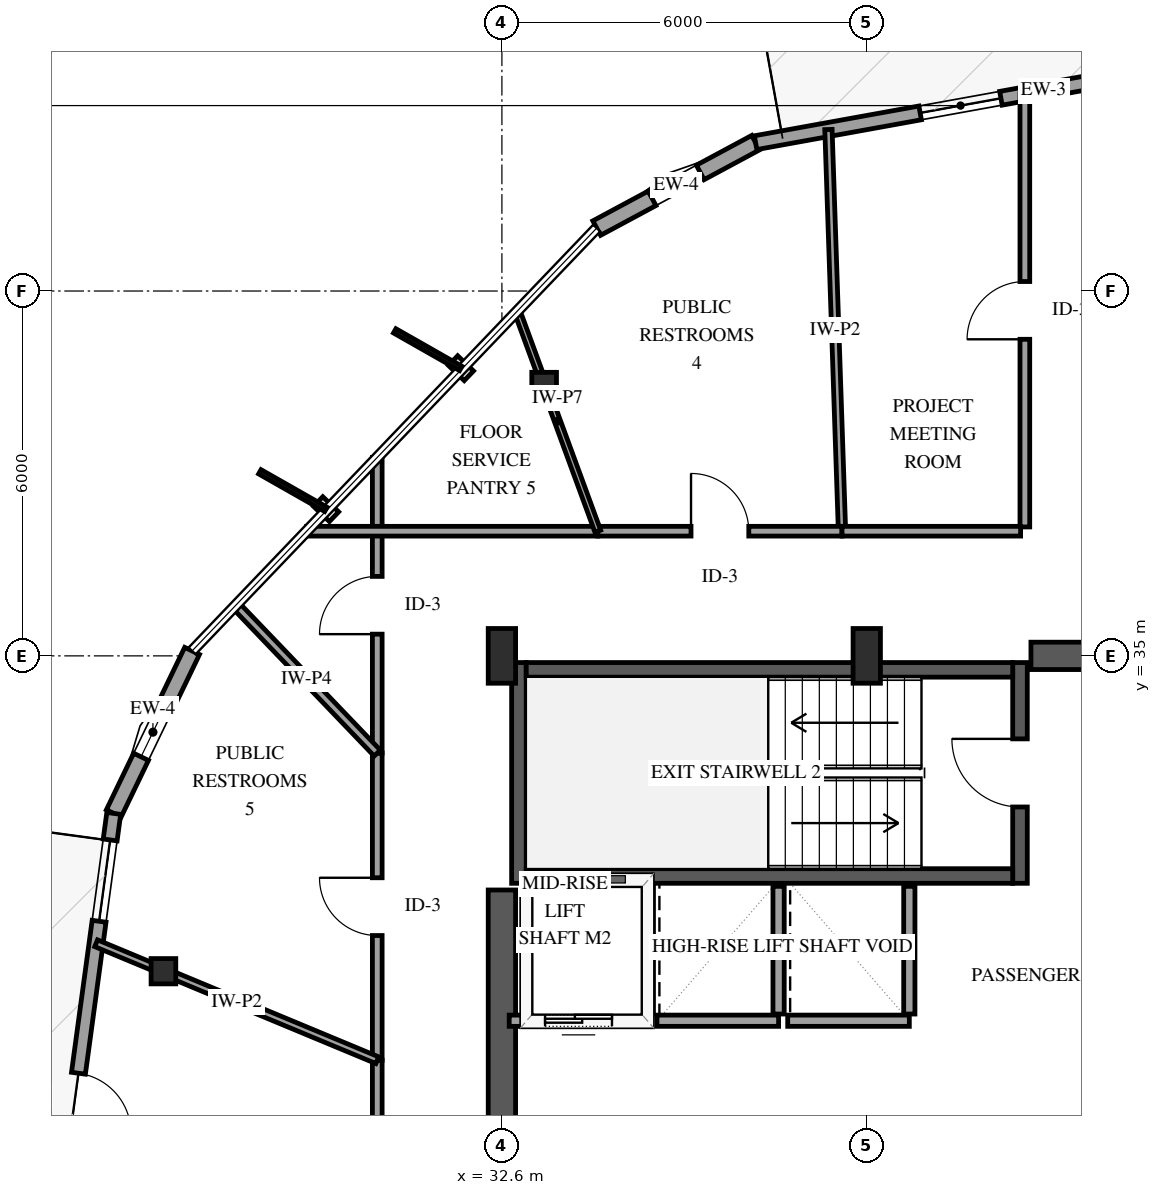
"""IFC4 building model, lengths in metres.
Left out: names, types, materials, properties, quantities, classifications, styles, units other than length and angle.
Written with IfcOpenShell. Run it as: python <this file> out.ifc"""

import sys

from ifc_helpers import new_model, si_unit, direction, frame, frame_2d, origin, origin_2d, place, context, subcontext, project, spatial, rectangle, i_section, extrude, element, fill, save


model = new_model("IFC4")
c1 = context("Model", 3, precision=1e-05, world=origin(), true_north=direction((0.0, 1.0)))
c2 = subcontext(c1, "Body", "Model", "MODEL_VIEW")
j1 = project(units=[si_unit("LENGTHUNIT", "METRE"), si_unit("PLANEANGLEUNIT", "RADIAN")], contexts=[c1])
p1 = place(None, origin())
s1 = spatial("IfcSite", under=j1, at=p1, CompositionType="ELEMENT")
p2 = place(p1, origin())
s2 = spatial("IfcBuilding", under=s1, at=p2, CompositionType="ELEMENT")
p3 = place(p2, frame((0.0, 0.0, 208.6)))
s3 = spatial("IfcBuildingStorey", under=s2, at=p3, CompositionType="ELEMENT", Elevation=208.6)
p4 = place(p3, frame((32.88, 31.26, 0.0), z_axis=(0.0, 0.0, 1.0), x_axis=(0.0, 1.0, 0.0)))
e1 = element("IfcWall", 1, at=p4, inside=s3, PredefinedType="SHEAR", context=c2, shape_type="SweptSolid", body=[
    extrude(rectangle(XDim=3.63, YDim=0.24, at=frame_2d((1.815, 0.0))), origin(), (0.0, 0.0, 1.0), 3.6),
])
p5 = place(p3, frame((41.12, 31.26, 0.0), z_axis=(0.0, 0.0, 1.0), x_axis=(0.0, 1.0, 0.0)))
e2 = element("IfcWall", 2, at=p5, inside=s3, PredefinedType="SHEAR", context=c2, shape_type="SweptSolid", body=[
    extrude(rectangle(XDim=3.63, YDim=0.24, at=frame_2d((1.815, 0.0))), origin(), (0.0, 0.0, 1.0), 3.6),
])
p6 = place(p5, frame((1.255, 0.0, 0.0)))
e3 = element("IfcOpeningElement", 3, at=p6, cuts=e2, PredefinedType="OPENING", context=c2, shape_type="SweptSolid", body=[
    extrude(rectangle(XDim=1.12, YDim=2.15, at=frame_2d((0.56, 1.075))), frame((0.0, 0.13, 0.0), z_axis=(0.0, -1.0, 0.0), x_axis=(1.0, 0.0, 0.0)), (0.0, 0.0, 1.0), 0.26),
])
for number, where, z_axis, x_axis in (
    (4, (33.0, 31.38, 0.0), (0.0, 0.0, 1.0), (1.0, 0.0, 0.0)),
    (5, (33.0, 34.77, 0.0), (0.0, 0.0, 1.0), (1.0, 0.0, 0.0)),
):
    element("IfcWall", number, at=place(p3, frame(where, z_axis=z_axis, x_axis=x_axis)), inside=s3, PredefinedType="SHEAR", context=c2, shape_type="SweptSolid", body=[
        extrude(rectangle(XDim=8.0, YDim=0.24, at=frame_2d((4.0, 0.0))), origin(), (0.0, 0.0, 1.0), 3.6),
    ])
p7 = place(p3, frame((32.6, 18.85, 0.0), z_axis=(0.0, 0.0, 1.0), x_axis=(0.0, 1.0, 0.0)))
e6 = element("IfcWall", 6, at=p7, inside=s3, PredefinedType="SHEAR", context=c2, shape_type="SweptSolid", body=[
    extrude(rectangle(XDim=12.3, YDim=0.45, at=frame_2d((6.15, 0.0))), origin(), (0.0, 0.0, 1.0), 3.6),
])
p8 = place(p3, frame((41.3, 35.0, 0.0), z_axis=(0.0, 0.0, 1.0), x_axis=(1.0, 0.0, 0.0)))
e7 = element("IfcWall", 7, at=p8, inside=s3, PredefinedType="SHEAR", context=c2, shape_type="SweptSolid", body=[
    extrude(rectangle(XDim=2.85, YDim=0.45, at=frame_2d((1.425, 0.0))), origin(), (0.0, 0.0, 1.0), 3.6),
])
for number, where, z_axis, x_axis in (
    (8, (32.6, 35.0, 0.0), (0.0, 0.0, 1.0), (1.0, 0.0, 0.0)),
    (9, (38.6, 35.0, 0.0), (0.0, 0.0, 1.0), (1.0, 0.0, 0.0)),
):
    element("IfcColumn", number, at=place(p3, frame(where, z_axis=z_axis, x_axis=x_axis)), inside=s3, PredefinedType="PILASTER", context=c2, shape_type="SweptSolid", body=[
        extrude(rectangle(XDim=0.45, YDim=0.9, at=origin_2d()), origin(), (0.0, 0.0, 1.0), 3.6),
    ])
for number, where, z_axis, x_axis in (
    (10, (33.295, 39.455, 0.0), (0.0, 0.0, 1.0), (1.0, 0.0, 0.0)),
    (11, (27.034, 29.814, 0.0), (0.0, 0.0, 1.0), (1.0, 0.0, 0.0)),
):
    element("IfcColumn", number, at=place(p3, frame(where, z_axis=z_axis, x_axis=x_axis)), inside=s3, PredefinedType="COLUMN", context=c2, shape_type="SweptSolid", body=[
        extrude(i_section(OverallWidth=0.406, OverallDepth=0.416, WebThickness=0.03, FlangeThickness=0.048, FilletRadius=0.038, at=origin_2d()), origin(), (0.0, 0.0, 1.0), 3.6),
    ])
p9 = place(p3, frame((36.772, 43.439, 0.0), z_axis=(0.0, 0.0, 1.0), x_axis=(-0.880819678066, -0.473451892732, 0.0)))
e12 = element("IfcWall", 12, at=p9, inside=s3, PredefinedType="SOLIDWALL", context=c2, shape_type="SweptSolid", body=[
    extrude(rectangle(XDim=2.967, YDim=0.27, at=frame_2d((1.483, 0.0))), origin(), (0.0, 0.0, 1.0), 2.679),
])
p10 = place(p9, frame((1.033, 0.0, 0.75)))
e13 = element("IfcOpeningElement", 13, at=p10, cuts=e12, PredefinedType="OPENING", context=c2, shape_type="SweptSolid", body=[
    extrude(rectangle(XDim=0.9, YDim=1.5, at=frame_2d((0.45, 0.75))), frame((0.0, 0.145, 0.0), z_axis=(0.0, -1.0, 0.0), x_axis=(1.0, 0.0, 0.0)), (0.0, 0.0, 1.0), 0.29),
])
p11 = place(p3, frame((46.242, 45.154, 0.0), z_axis=(0.0, 0.0, 1.0), x_axis=(-0.984006003463, -0.178135300119, 0.0)))
e14 = element("IfcWall", 14, at=p11, inside=s3, PredefinedType="SOLIDWALL", context=c2, shape_type="SweptSolid", body=[
    extrude(rectangle(XDim=9.624, YDim=0.23, at=frame_2d((4.812, 0.0))), origin(), (0.0, 0.0, 1.0), 2.679),
])
p12 = place(p11, frame((0.65, 0.0, 0.0)))
e15 = element("IfcOpeningElement", 15, at=p12, cuts=e14, PredefinedType="OPENING", context=c2, shape_type="SweptSolid", body=[
    extrude(rectangle(XDim=1.0, YDim=2.15, at=frame_2d((0.5, 1.075))), frame((0.0, 0.125, 0.0), z_axis=(0.0, -1.0, 0.0), x_axis=(1.0, 0.0, 0.0)), (0.0, 0.0, 1.0), 0.25),
])
p13 = place(p11, frame((5.524, 0.0, 0.72)))
e16 = element("IfcOpeningElement", 16, at=p13, cuts=e14, PredefinedType="OPENING", context=c2, shape_type="SweptSolid", body=[
    extrude(rectangle(XDim=1.35, YDim=1.65, at=frame_2d((0.675, 0.825))), frame((0.0, 0.125, 0.0), z_axis=(0.0, -1.0, 0.0), x_axis=(1.0, 0.0, 0.0)), (0.0, 0.0, 1.0), 0.25),
])
p14 = place(p3, frame((27.505, 35.081, 0.0), z_axis=(0.0, 0.0, 1.0), x_axis=(-0.434295608334, -0.900770406142, 0.0)))
e17 = element("IfcWall", 17, at=p14, inside=s3, PredefinedType="SOLIDWALL", context=c2, shape_type="SweptSolid", body=[
    extrude(rectangle(XDim=2.967, YDim=0.27, at=frame_2d((1.483, 0.0))), origin(), (0.0, 0.0, 1.0), 2.679),
])
p15 = place(p14, frame((1.033, 0.0, 0.75)))
e18 = element("IfcOpeningElement", 18, at=p15, cuts=e17, PredefinedType="OPENING", context=c2, shape_type="SweptSolid", body=[
    extrude(rectangle(XDim=0.9, YDim=1.5, at=frame_2d((0.45, 0.75))), frame((0.0, 0.145, 0.0), z_axis=(0.0, -1.0, 0.0), x_axis=(1.0, 0.0, 0.0)), (0.0, 0.0, 1.0), 0.29),
])
p16 = place(p3, frame((26.217, 32.409, 0.0), z_axis=(0.0, 0.0, 1.0), x_axis=(-0.134677360418, -0.990889503724, 0.0)))
e19 = element("IfcWall", 19, at=p16, inside=s3, PredefinedType="SOLIDWALL", context=c2, shape_type="SweptSolid", body=[
    extrude(rectangle(XDim=9.624, YDim=0.23, at=frame_2d((4.812, 0.0))), origin(), (0.0, 0.0, 1.0), 2.679),
])
p17 = place(p16, frame((4.312, 0.0, 0.0)))
e20 = element("IfcOpeningElement", 20, at=p17, cuts=e19, PredefinedType="OPENING", context=c2, shape_type="SweptSolid", body=[
    extrude(rectangle(XDim=1.0, YDim=2.15, at=frame_2d((0.5, 1.075))), frame((0.0, 0.125, 0.0), z_axis=(0.0, -1.0, 0.0), x_axis=(1.0, 0.0, 0.0)), (0.0, 0.0, 1.0), 0.25),
])
p18 = place(p16, frame((0.44, 0.0, 0.72)))
e21 = element("IfcOpeningElement", 21, at=p18, cuts=e19, PredefinedType="OPENING", context=c2, shape_type="SweptSolid", body=[
    extrude(rectangle(XDim=1.35, YDim=1.65, at=frame_2d((0.675, 0.825))), frame((0.0, 0.125, 0.0), z_axis=(0.0, -1.0, 0.0), x_axis=(1.0, 0.0, 0.0)), (0.0, 0.0, 1.0), 0.25),
])
p19 = place(p16, frame((5.952, 0.0, 0.72)))
e22 = element("IfcOpeningElement", 22, at=p19, cuts=e19, PredefinedType="OPENING", context=c2, shape_type="SweptSolid", body=[
    extrude(rectangle(XDim=1.35, YDim=1.65, at=frame_2d((0.675, 0.825))), frame((0.0, 0.125, 0.0), z_axis=(0.0, -1.0, 0.0), x_axis=(1.0, 0.0, 0.0)), (0.0, 0.0, 1.0), 0.25),
])
p20 = place(p3, frame((32.72, 29.0, 0.0), z_axis=(0.0, 0.0, 1.0), x_axis=(1.0, 0.0, 0.0)))
e23 = element("IfcWall", 23, at=p20, inside=s3, PredefinedType="SOLIDWALL", context=c2, shape_type="SweptSolid", body=[
    extrude(rectangle(XDim=2.28, YDim=0.185, at=frame_2d((1.14, 0.0))), origin(), (0.0, 0.0, 1.0), 3.3),
])
p21 = place(p20, frame((0.59, 0.0, 0.0)))
e24 = element("IfcOpeningElement", 24, at=p21, cuts=e23, PredefinedType="OPENING", context=c2, shape_type="SweptSolid", body=[
    extrude(rectangle(XDim=1.1, YDim=2.15, at=frame_2d((0.55, 1.075))), frame((0.0, 0.103, 0.0), z_axis=(0.0, -1.0, 0.0), x_axis=(1.0, 0.0, 0.0)), (0.0, 0.0, 1.0), 0.205),
])
p22 = place(p3, frame((35.0, 29.11, 0.0), z_axis=(0.0, 0.0, 1.0), x_axis=(0.0, 1.0, 0.0)))
e25 = element("IfcWall", 25, at=p22, inside=s3, PredefinedType="SOLIDWALL", context=c2, shape_type="SweptSolid", body=[
    extrude(rectangle(XDim=2.1, YDim=0.185, at=frame_2d((1.05, 0.0))), origin(), (0.0, 0.0, 1.0), 3.3),
])
p23 = place(p3, frame((35.15, 29.0, 0.0), z_axis=(0.0, 0.0, 1.0), x_axis=(1.0, 0.0, 0.0)))
e26 = element("IfcWall", 26, at=p23, inside=s3, PredefinedType="SOLIDWALL", context=c2, shape_type="SweptSolid", body=[
    extrude(rectangle(XDim=2.0, YDim=0.185, at=frame_2d((1.0, 0.0))), origin(), (0.0, 0.0, 1.0), 3.3),
])
p24 = place(p3, frame((37.15, 29.11, 0.0), z_axis=(0.0, 0.0, 1.0), x_axis=(0.0, 1.0, 0.0)))
e27 = element("IfcWall", 27, at=p24, inside=s3, PredefinedType="SOLIDWALL", context=c2, shape_type="SweptSolid", body=[
    extrude(rectangle(XDim=2.1, YDim=0.185, at=frame_2d((1.05, 0.0))), origin(), (0.0, 0.0, 1.0), 3.3),
])
p25 = place(p3, frame((37.3, 29.0, 0.0), z_axis=(0.0, 0.0, 1.0), x_axis=(1.0, 0.0, 0.0)))
e28 = element("IfcWall", 28, at=p25, inside=s3, PredefinedType="SOLIDWALL", context=c2, shape_type="SweptSolid", body=[
    extrude(rectangle(XDim=2.0, YDim=0.185, at=frame_2d((1.0, 0.0))), origin(), (0.0, 0.0, 1.0), 3.3),
])
p26 = place(p3, frame((39.3, 29.11, 0.0), z_axis=(0.0, 0.0, 1.0), x_axis=(0.0, 1.0, 0.0)))
e29 = element("IfcWall", 29, at=p26, inside=s3, PredefinedType="SOLIDWALL", context=c2, shape_type="SweptSolid", body=[
    extrude(rectangle(XDim=2.1, YDim=0.185, at=frame_2d((1.05, 0.0))), origin(), (0.0, 0.0, 1.0), 3.3),
])
p27 = place(p3, frame((30.55, 20.106, 0.0), z_axis=(0.0, 0.0, 1.0), x_axis=(0.0, 1.0, 0.0)))
e30 = element("IfcWall", 30, at=p27, inside=s3, PredefinedType="PARTITIONING", context=c2, shape_type="SweptSolid", body=[
    extrude(rectangle(XDim=8.245, YDim=0.16, at=frame_2d((4.123, 0.0))), origin(), (0.0, 0.0, 1.0), 3.3),
])
p28 = place(p27, frame((3.647, 0.0, 0.0)))
e31 = element("IfcOpeningElement", 31, at=p28, cuts=e30, PredefinedType="OPENING", context=c2, shape_type="SweptSolid", body=[
    extrude(rectangle(XDim=0.95, YDim=2.15, at=frame_2d((0.475, 1.075))), frame((0.0, 0.09, 0.0), z_axis=(0.0, -1.0, 0.0), x_axis=(1.0, 0.0, 0.0)), (0.0, 0.0, 1.0), 0.18),
])
p29 = place(p3, frame((41.2, 37.12, 0.0), z_axis=(0.0, 0.0, 1.0), x_axis=(0.0, 1.0, 0.0)))
e32 = element("IfcWall", 32, at=p29, inside=s3, PredefinedType="PARTITIONING", context=c2, shape_type="SweptSolid", body=[
    extrude(rectangle(XDim=7.121, YDim=0.16, at=frame_2d((3.561, 0.0))), origin(), (0.0, 0.0, 1.0), 2.674),
])
p30 = place(p29, frame((3.086, 0.0, 0.0)))
e33 = element("IfcOpeningElement", 33, at=p30, cuts=e32, PredefinedType="OPENING", context=c2, shape_type="SweptSolid", body=[
    extrude(rectangle(XDim=0.95, YDim=2.15, at=frame_2d((0.475, 1.075))), frame((0.0, 0.09, 0.0), z_axis=(0.0, -1.0, 0.0), x_axis=(1.0, 0.0, 0.0)), (0.0, 0.0, 1.0), 0.18),
])
p31 = place(p3, frame((38.193, 37.05, 0.0), z_axis=(0.0, 0.0, 1.0), x_axis=(-0.033760033646, 0.999429967596, 0.0)))
e34 = element("IfcWall", 34, at=p31, inside=s3, PredefinedType="PARTITIONING", context=c2, shape_type="SweptSolid", body=[
    extrude(rectangle(XDim=6.61, YDim=0.12, at=frame_2d((3.305, 0.0))), origin(), (0.0, 0.0, 1.0), 3.3),
])
p32 = place(p3, frame((30.55, 28.351, 0.0), z_axis=(0.0, 0.0, 1.0), x_axis=(0.0, 1.0, 0.0)))
e35 = element("IfcWall", 35, at=p32, inside=s3, PredefinedType="PARTITIONING", context=c2, shape_type="SweptSolid", body=[
    extrude(rectangle(XDim=5.05, YDim=0.16, at=frame_2d((2.525, 0.0))), origin(), (0.0, 0.0, 1.0), 3.3),
])
p33 = place(p32, frame((2.05, 0.0, 0.0)))
e36 = element("IfcOpeningElement", 36, at=p33, cuts=e35, PredefinedType="OPENING", context=c2, shape_type="SweptSolid", body=[
    extrude(rectangle(XDim=0.95, YDim=2.15, at=frame_2d((0.475, 1.075))), frame((0.0, 0.09, 0.0), z_axis=(0.0, -1.0, 0.0), x_axis=(1.0, 0.0, 0.0)), (0.0, 0.0, 1.0), 0.18),
])
p34 = place(p3, frame((30.55, 28.351, 0.0), z_axis=(0.0, 0.0, 1.0), x_axis=(-0.923319097145, 0.384033650671, 0.0)))
e37 = element("IfcWall", 37, at=p34, inside=s3, PredefinedType="PARTITIONING", context=c2, shape_type="SweptSolid", body=[
    extrude(rectangle(XDim=5.007, YDim=0.12, at=frame_2d((2.503, 0.0))), origin(), (0.0, 0.0, 1.0), 3.3),
])
p35 = place(p3, frame((30.55, 33.401, 0.0), z_axis=(0.0, 0.0, 1.0), x_axis=(0.0, 1.0, 0.0)))
e38 = element("IfcWall", 38, at=p35, inside=s3, PredefinedType="PARTITIONING", context=c2, shape_type="SweptSolid", body=[
    extrude(rectangle(XDim=4.862, YDim=0.16, at=frame_2d((2.431, 0.0))), origin(), (0.0, 0.0, 1.0), 3.3),
])
p36 = place(p35, frame((1.956, 0.0, 0.0)))
e39 = element("IfcOpeningElement", 39, at=p36, cuts=e38, PredefinedType="OPENING", context=c2, shape_type="SweptSolid", body=[
    extrude(rectangle(XDim=0.95, YDim=2.15, at=frame_2d((0.475, 1.075))), frame((0.0, 0.09, 0.0), z_axis=(0.0, -1.0, 0.0), x_axis=(1.0, 0.0, 0.0)), (0.0, 0.0, 1.0), 0.18),
])
p37 = place(p3, frame((29.389, 37.05, 0.0), z_axis=(0.0, 0.0, 1.0), x_axis=(1.0, 0.0, 0.0)))
e40 = element("IfcWall", 40, at=p37, inside=s3, PredefinedType="PARTITIONING", context=c2, shape_type="SweptSolid", body=[
    extrude(rectangle(XDim=4.788, YDim=0.16, at=frame_2d((2.394, 0.0))), origin(), (0.0, 0.0, 1.0), 3.3),
])
p38 = place(p3, frame((34.177, 37.05, 0.0), z_axis=(0.0, 0.0, 1.0), x_axis=(1.0, 0.0, 0.0)))
e41 = element("IfcWall", 41, at=p38, inside=s3, PredefinedType="PARTITIONING", context=c2, shape_type="SweptSolid", body=[
    extrude(rectangle(XDim=4.016, YDim=0.16, at=frame_2d((2.008, 0.0))), origin(), (0.0, 0.0, 1.0), 3.3),
])
p39 = place(p38, frame((1.533, 0.0, 0.0)))
e42 = element("IfcOpeningElement", 42, at=p39, cuts=e41, PredefinedType="OPENING", context=c2, shape_type="SweptSolid", body=[
    extrude(rectangle(XDim=0.95, YDim=2.15, at=frame_2d((0.475, 1.075))), frame((0.0, 0.09, 0.0), z_axis=(0.0, -1.0, 0.0), x_axis=(1.0, 0.0, 0.0)), (0.0, 0.0, 1.0), 0.18),
])
p40 = place(p3, frame((34.177, 37.05, 0.0), z_axis=(0.0, 0.0, 1.0), x_axis=(-0.344412912705, 0.938818270786, 0.0)))
e43 = element("IfcWall", 43, at=p40, inside=s3, PredefinedType="PARTITIONING", context=c2, shape_type="SweptSolid", body=[
    extrude(rectangle(XDim=3.853, YDim=0.1, at=frame_2d((1.926, 0.0))), origin(), (0.0, 0.0, 1.0), 2.595),
])
p41 = place(p3, frame((30.55, 33.401, 0.0), z_axis=(0.0, 0.0, 1.0), x_axis=(-0.691782454631, 0.722105972462, 0.0)))
e44 = element("IfcWall", 44, at=p41, inside=s3, PredefinedType="PARTITIONING", context=c2, shape_type="SweptSolid", body=[
    extrude(rectangle(XDim=3.365, YDim=0.14, at=frame_2d((1.683, 0.0))), origin(), (0.0, 0.0, 1.0), 3.3),
])
p42 = place(p3, frame((38.193, 37.05, 0.0), z_axis=(0.0, 0.0, 1.0), x_axis=(1.0, 0.0, 0.0)))
e45 = element("IfcWall", 45, at=p42, inside=s3, PredefinedType="PARTITIONING", context=c2, shape_type="SweptSolid", body=[
    extrude(rectangle(XDim=2.937, YDim=0.16, at=frame_2d((1.468, 0.0))), origin(), (0.0, 0.0, 1.0), 3.3),
])
p43 = place(p10, origin())
e46 = element("IfcWindow", 46, at=p43, inside=s3, PartitioningType="SINGLE_PANEL", PredefinedType="WINDOW", context=c2, shape_type="SweptSolid", body=[
    extrude(rectangle(XDim=0.9, YDim=1.5, at=frame_2d((0.45, 0.75))), frame((0.0, 0.03, 0.0), z_axis=(0.0, -1.0, 0.0), x_axis=(1.0, 0.0, 0.0)), (0.0, 0.0, 1.0), 0.06),
])
fill(e13, e46)
p44 = place(p13, origin())
e47 = element("IfcWindow", 47, at=p44, inside=s3, PartitioningType="SINGLE_PANEL", PredefinedType="WINDOW", context=c2, shape_type="SweptSolid", body=[
    extrude(rectangle(XDim=1.35, YDim=1.65, at=frame_2d((0.675, 0.825))), frame((0.0, 0.03, 0.0), z_axis=(0.0, -1.0, 0.0), x_axis=(1.0, 0.0, 0.0)), (0.0, 0.0, 1.0), 0.06),
])
fill(e16, e47)
p45 = place(p15, origin())
e48 = element("IfcWindow", 48, at=p45, inside=s3, PartitioningType="SINGLE_PANEL", PredefinedType="WINDOW", context=c2, shape_type="SweptSolid", body=[
    extrude(rectangle(XDim=0.9, YDim=1.5, at=frame_2d((0.45, 0.75))), frame((0.0, 0.03, 0.0), z_axis=(0.0, -1.0, 0.0), x_axis=(1.0, 0.0, 0.0)), (0.0, 0.0, 1.0), 0.06),
])
fill(e18, e48)
p46 = place(p17, origin())
e49 = element("IfcDoor", 49, at=p46, inside=s3, OperationType="SINGLE_SWING_RIGHT", PredefinedType="DOOR", context=c2, shape_type="SweptSolid", body=[
    extrude(rectangle(XDim=1.0, YDim=2.15, at=frame_2d((0.5, 1.075))), frame((0.0, 0.025, 0.0), z_axis=(0.0, -1.0, 0.0), x_axis=(1.0, 0.0, 0.0)), (0.0, 0.0, 1.0), 0.05),
])
fill(e20, e49)
p47 = place(p18, origin())
e50 = element("IfcWindow", 50, at=p47, inside=s3, PartitioningType="SINGLE_PANEL", PredefinedType="WINDOW", context=c2, shape_type="SweptSolid", body=[
    extrude(rectangle(XDim=1.35, YDim=1.65, at=frame_2d((0.675, 0.825))), frame((0.0, 0.03, 0.0), z_axis=(0.0, -1.0, 0.0), x_axis=(1.0, 0.0, 0.0)), (0.0, 0.0, 1.0), 0.06),
])
fill(e21, e50)
p48 = place(p21, origin())
e51 = element("IfcDoor", 51, at=p48, inside=s3, OperationType="SLIDING_TO_LEFT", PredefinedType="DOOR", context=c2, shape_type="SweptSolid", body=[
    extrude(rectangle(XDim=1.1, YDim=2.15, at=frame_2d((0.55, 1.075))), frame((0.0, 0.025, 0.0), z_axis=(0.0, -1.0, 0.0), x_axis=(1.0, 0.0, 0.0)), (0.0, 0.0, 1.0), 0.05),
])
fill(e24, e51)
p49 = place(p6, origin())
e52 = element("IfcDoor", 52, at=p49, inside=s3, OperationType="SINGLE_SWING_RIGHT", PredefinedType="DOOR", context=c2, shape_type="SweptSolid", body=[
    extrude(rectangle(XDim=1.12, YDim=2.15, at=frame_2d((0.56, 1.075))), frame((0.0, 0.025, 0.0), z_axis=(0.0, -1.0, 0.0), x_axis=(1.0, 0.0, 0.0)), (0.0, 0.0, 1.0), 0.05),
])
fill(e3, e52)
p50 = place(p30, origin())
e53 = element("IfcDoor", 53, at=p50, inside=s3, OperationType="SINGLE_SWING_LEFT", PredefinedType="DOOR", context=c2, shape_type="SweptSolid", body=[
    extrude(rectangle(XDim=0.95, YDim=2.15, at=frame_2d((0.475, 1.075))), frame((0.0, 0.025, 0.0), z_axis=(0.0, -1.0, 0.0), x_axis=(1.0, 0.0, 0.0)), (0.0, 0.0, 1.0), 0.05),
])
fill(e33, e53)
p51 = place(p33, origin())
e54 = element("IfcDoor", 54, at=p51, inside=s3, OperationType="SINGLE_SWING_RIGHT", PredefinedType="DOOR", context=c2, shape_type="SweptSolid", body=[
    extrude(rectangle(XDim=0.95, YDim=2.15, at=frame_2d((0.475, 1.075))), frame((0.0, 0.025, 0.0), z_axis=(0.0, -1.0, 0.0), x_axis=(1.0, 0.0, 0.0)), (0.0, 0.0, 1.0), 0.05),
])
fill(e36, e54)
p52 = place(p36, origin())
e55 = element("IfcDoor", 55, at=p52, inside=s3, OperationType="SINGLE_SWING_LEFT", PredefinedType="DOOR", context=c2, shape_type="SweptSolid", body=[
    extrude(rectangle(XDim=0.95, YDim=2.15, at=frame_2d((0.475, 1.075))), frame((0.0, 0.025, 0.0), z_axis=(0.0, -1.0, 0.0), x_axis=(1.0, 0.0, 0.0)), (0.0, 0.0, 1.0), 0.05),
])
fill(e39, e55)
p53 = place(p39, origin())
e56 = element("IfcDoor", 56, at=p53, inside=s3, OperationType="SINGLE_SWING_LEFT", PredefinedType="DOOR", context=c2, shape_type="SweptSolid", body=[
    extrude(rectangle(XDim=0.95, YDim=2.15, at=frame_2d((0.475, 1.075))), frame((0.0, 0.025, 0.0), z_axis=(0.0, -1.0, 0.0), x_axis=(1.0, 0.0, 0.0)), (0.0, 0.0, 1.0), 0.05),
])
fill(e42, e56)
save(model, sys.argv[1])
